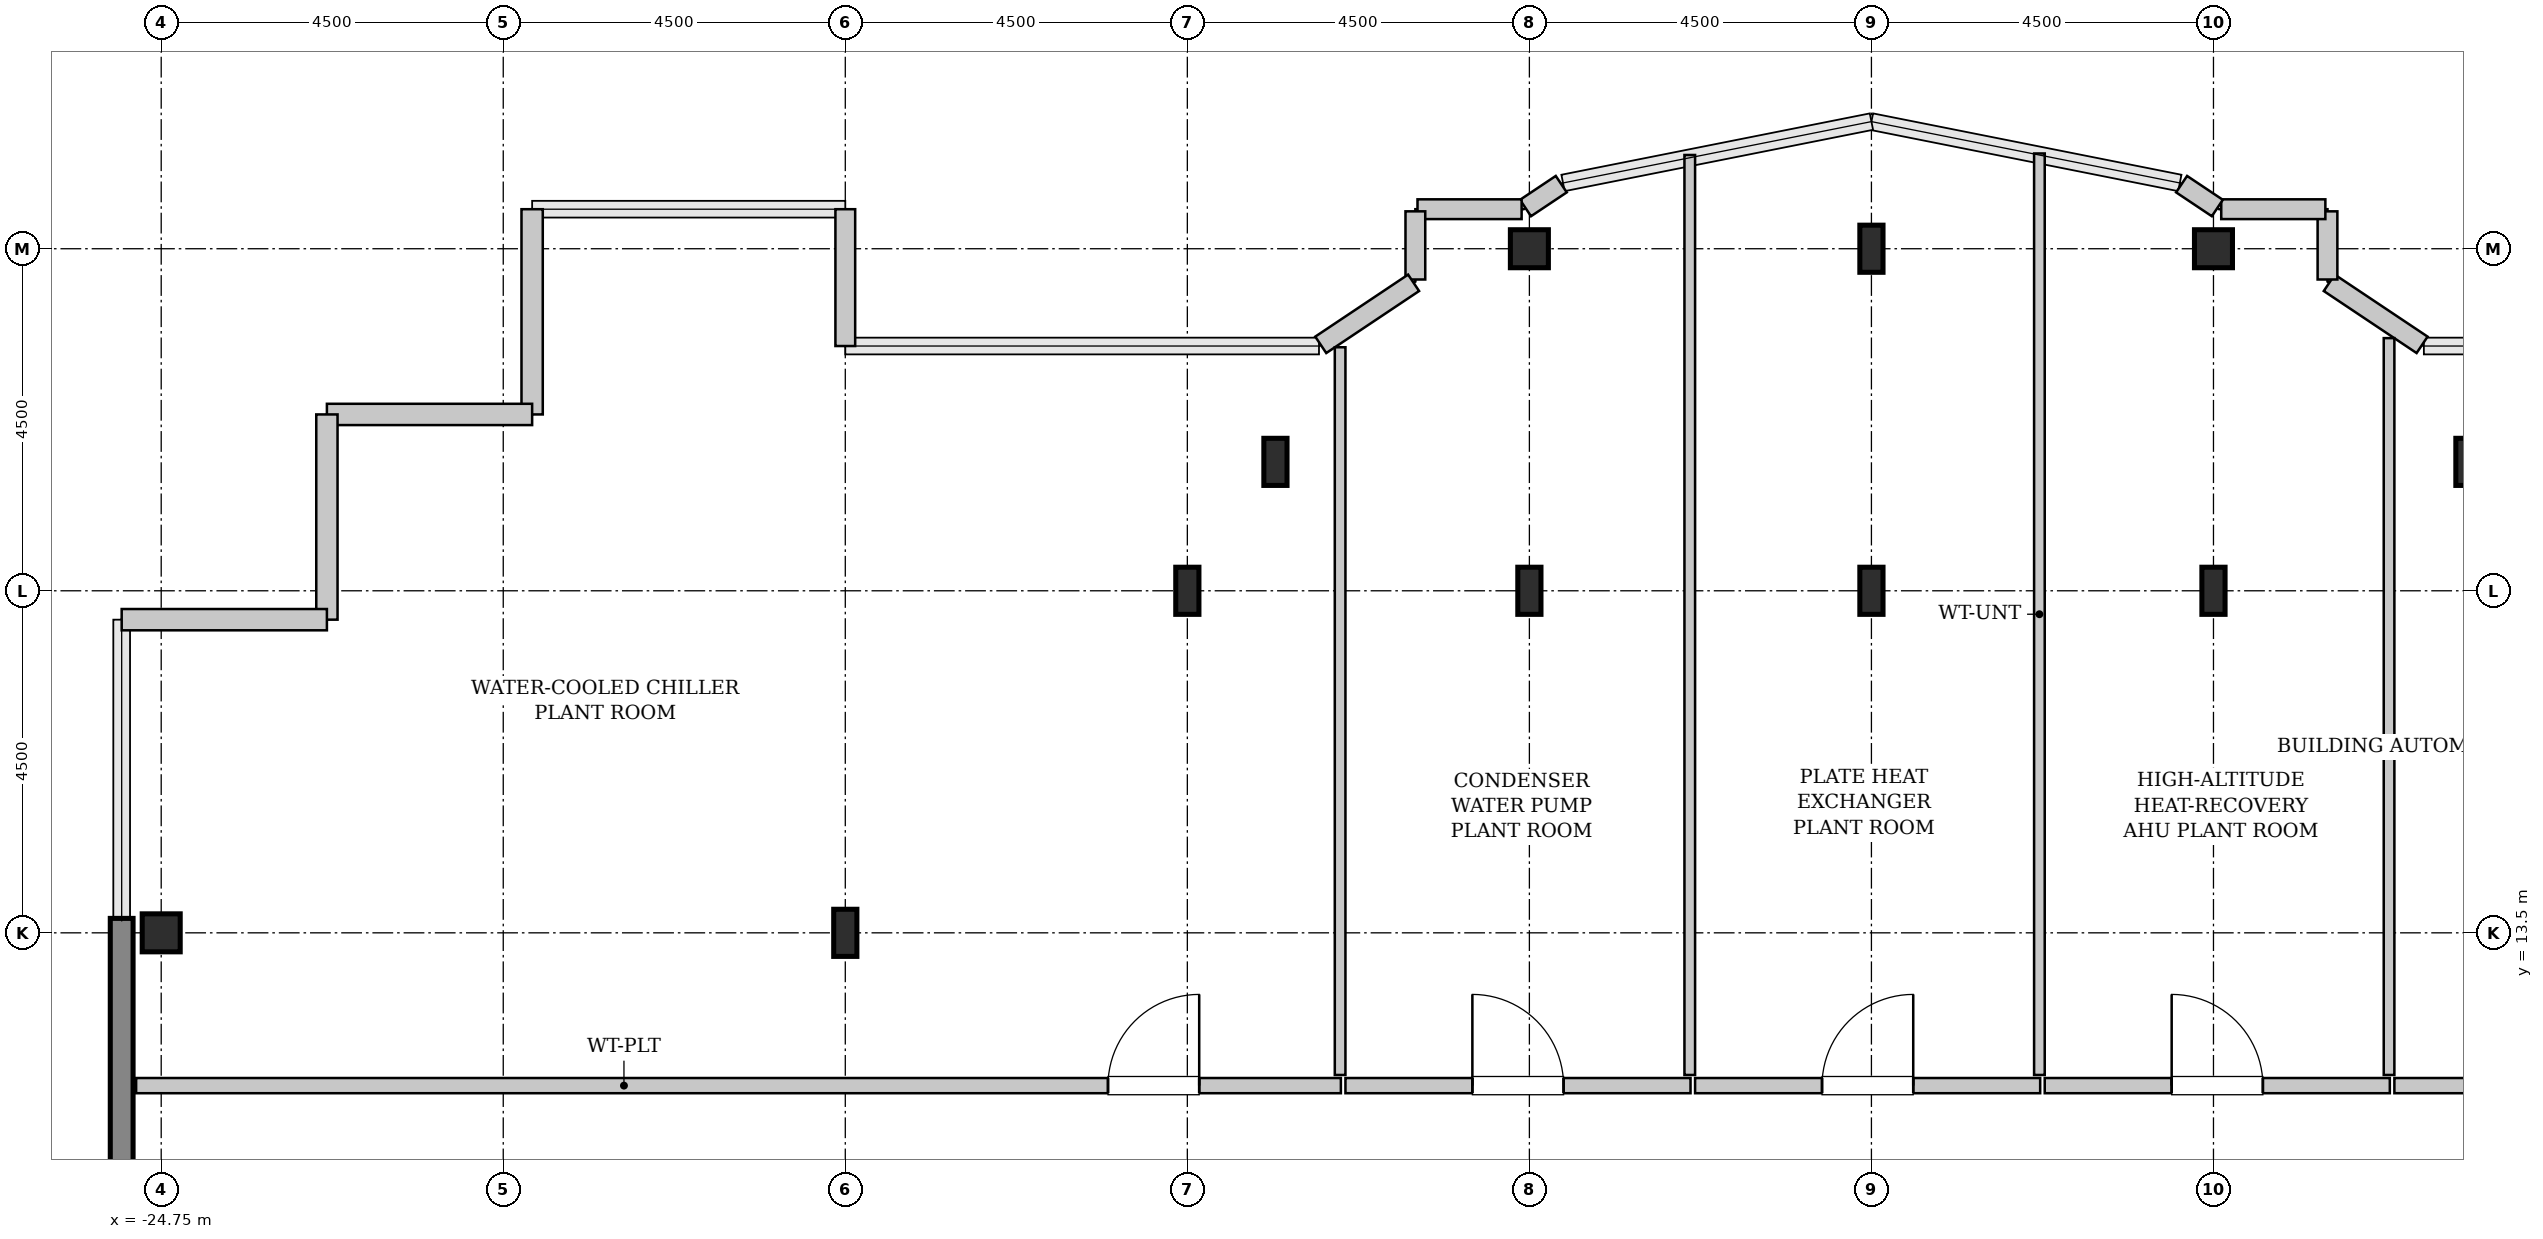
"""IFC4 building model, lengths in metres.
Left out: names, types, materials, properties, quantities, classifications, styles, units other than length and angle.
Written with IfcOpenShell. Run it as: python <this file> out.ifc"""

import sys

from ifc_helpers import new_model, si_unit, direction, frame, frame_2d, origin, origin_2d, place, context, subcontext, project, spatial, rectangle, hollow_rectangle, i_section, extrude, source, transform, mapped, element, fill, save


model = new_model("IFC4")
c1 = context("Model", 3, precision=1e-05, world=origin(), true_north=direction((0.0, 1.0)))
c2 = subcontext(c1, "Body", "Model", "MODEL_VIEW")
j1 = project(units=[si_unit("LENGTHUNIT", "METRE"), si_unit("PLANEANGLEUNIT", "RADIAN")], contexts=[c1])
p1 = place(None, origin())
s1 = spatial("IfcSite", under=j1, at=p1, CompositionType="ELEMENT")
p2 = place(p1, origin())
s2 = spatial("IfcBuilding", under=s1, at=p2, CompositionType="ELEMENT")
p3 = place(p2, frame((0.0, 0.0, 317.8)))
s3 = spatial("IfcBuildingStorey", under=s2, at=p3, CompositionType="ELEMENT", Elevation=317.8)
m1 = source(origin(), c2, "Body", "SweptSolid", [
    extrude(hollow_rectangle(XDim=0.5, YDim=0.5, WallThickness=0.025, InnerFilletRadius=0.025, OuterFilletRadius=0.05, at=origin_2d()), origin(), (0.0, 0.0, 1.0), 4.6),
])
p4 = place(p3, frame((-24.75, 13.5, 0.0), z_axis=(0.0, 0.0, 1.0), x_axis=(1.0, 0.0, 0.0)))
e1 = element("IfcColumn", 1, at=p4, inside=s3, PredefinedType="COLUMN", context=c2, shape_type="MappedRepresentation", body=[
    mapped(m1, transform((0.0, 0.0, 0.0), x_axis=(1.0, 0.0, 0.0), y_axis=(0.0, 1.0, 0.0), z_axis=(0.0, 0.0, 1.0), scale=1.0)),
])
m2 = source(origin(), c2, "Body", "SweptSolid", [
    extrude(i_section(OverallWidth=0.305, OverallDepth=0.62, WebThickness=0.021, FlangeThickness=0.04, FilletRadius=0.027, at=origin_2d()), origin(), (0.0, 0.0, 1.0), 4.6),
])
for number, where, z_axis, x_axis in (
    (2, (-15.75, 13.5, 0.0), (0.0, 0.0, 1.0), (1.0, 0.0, 0.0)),
    (3, (-11.25, 18.0, 0.0), (0.0, 0.0, 1.0), (1.0, 0.0, 0.0)),
    (4, (-10.091, 19.696, 0.0), (0.0, 0.0, 1.0), (1.0, 0.0, 0.0)),
    (5, (-6.75, 18.0, 0.0), (0.0, 0.0, 1.0), (1.0, 0.0, 0.0)),
):
    element("IfcColumn", number, at=place(p3, frame(where, z_axis=z_axis, x_axis=x_axis)), inside=s3, PredefinedType="COLUMN", context=c2, shape_type="MappedRepresentation", body=[
        mapped(m2, transform((0.0, 0.0, 0.0), x_axis=(1.0, 0.0, 0.0), y_axis=(0.0, 1.0, 0.0), z_axis=(0.0, 0.0, 1.0), scale=1.0)),
    ])
p5 = place(p3, frame((-6.75, 22.5, 0.0), z_axis=(0.0, 0.0, 1.0), x_axis=(1.0, 0.0, 0.0)))
e6 = element("IfcColumn", 6, at=p5, inside=s3, PredefinedType="COLUMN", context=c2, shape_type="MappedRepresentation", body=[
    mapped(m1, transform((0.0, 0.0, 0.0), x_axis=(1.0, 0.0, 0.0), y_axis=(0.0, 1.0, 0.0), z_axis=(0.0, 0.0, 1.0), scale=1.0)),
])
for number, where, z_axis, x_axis in (
    (7, (-2.25, 18.0, 0.0), (0.0, 0.0, 1.0), (1.0, 0.0, 0.0)),
    (8, (-2.25, 22.5, 0.0), (0.0, 0.0, 1.0), (1.0, 0.0, 0.0)),
    (9, (2.25, 18.0, 0.0), (0.0, 0.0, 1.0), (1.0, 0.0, 0.0)),
):
    element("IfcColumn", number, at=place(p3, frame(where, z_axis=z_axis, x_axis=x_axis)), inside=s3, PredefinedType="COLUMN", context=c2, shape_type="MappedRepresentation", body=[
        mapped(m2, transform((0.0, 0.0, 0.0), x_axis=(1.0, 0.0, 0.0), y_axis=(0.0, 1.0, 0.0), z_axis=(0.0, 0.0, 1.0), scale=1.0)),
    ])
p6 = place(p3, frame((2.25, 22.5, 0.0), z_axis=(0.0, 0.0, 1.0), x_axis=(1.0, 0.0, 0.0)))
e10 = element("IfcColumn", 10, at=p6, inside=s3, PredefinedType="COLUMN", context=c2, shape_type="MappedRepresentation", body=[
    mapped(m1, transform((0.0, 0.0, 0.0), x_axis=(1.0, 0.0, 0.0), y_axis=(0.0, 1.0, 0.0), z_axis=(0.0, 0.0, 1.0), scale=1.0)),
])
p7 = place(p3, frame((5.591, 19.696, 0.0), z_axis=(0.0, 0.0, 1.0), x_axis=(1.0, 0.0, 0.0)))
e11 = element("IfcColumn", 11, at=p7, inside=s3, PredefinedType="COLUMN", context=c2, shape_type="MappedRepresentation", body=[
    mapped(m2, transform((0.0, 0.0, 0.0), x_axis=(1.0, 0.0, 0.0), y_axis=(0.0, 1.0, 0.0), z_axis=(0.0, 0.0, 1.0), scale=1.0)),
])
m3 = source(origin(), c2, "Body", "SweptSolid", [
    extrude(rectangle(XDim=9.38, YDim=0.3, at=frame_2d((4.69, 0.0))), origin(), (0.0, 0.0, 1.0), 4.35),
])
p8 = place(p3, frame((-25.27, 4.31, 0.0), z_axis=(0.0, 0.0, 1.0), x_axis=(0.0, 1.0, 0.0)))
e12 = element("IfcWall", 12, at=p8, inside=s3, PredefinedType="SHEAR", context=c2, shape_type="MappedRepresentation", body=[
    mapped(m3, transform((0.0, 0.0, 0.0), x_axis=(1.0, 0.0, 0.0), y_axis=(0.0, 1.0, 0.0), z_axis=(0.0, 0.0, 1.0), scale=1.0)),
])
m4 = source(origin(), c2, "Body", "SweptSolid", [
    extrude(rectangle(XDim=1.469, YDim=0.26, at=frame_2d((0.734, 0.0))), origin(), (0.0, 0.0, 1.0), 4.35),
])
p9 = place(p3, frame((4.995, 21.236, 0.0), z_axis=(0.0, 0.0, 1.0), x_axis=(-0.831461760506, 0.555581983884, 0.0)))
e13 = element("IfcWall", 13, at=p9, inside=s3, PredefinedType="SOLIDWALL", context=c2, shape_type="MappedRepresentation", body=[
    mapped(m4, transform((0.0, 0.0, 0.0), x_axis=(1.0, 0.0, 0.0), y_axis=(0.0, 1.0, 0.0), z_axis=(0.0, 0.0, 1.0), scale=1.0)),
])
m5 = source(origin(), c2, "Body", "SweptSolid", [
    extrude(rectangle(XDim=0.897, YDim=0.26, at=frame_2d((0.448, 0.0))), origin(), (0.0, 0.0, 1.0), 4.35),
])
p10 = place(p3, frame((3.75, 22.095, 0.0), z_axis=(0.0, 0.0, 1.0), x_axis=(0.0, 1.0, 0.0)))
e14 = element("IfcWall", 14, at=p10, inside=s3, PredefinedType="SOLIDWALL", context=c2, shape_type="MappedRepresentation", body=[
    mapped(m5, transform((0.0, 0.0, 0.0), x_axis=(1.0, 0.0, 0.0), y_axis=(0.0, 1.0, 0.0), z_axis=(0.0, 0.0, 1.0), scale=1.0)),
])
m6 = source(origin(), c2, "Body", "SweptSolid", [
    extrude(rectangle(XDim=1.37, YDim=0.26, at=frame_2d((0.685, 0.0))), origin(), (0.0, 0.0, 1.0), 4.35),
])
p11 = place(p3, frame((3.722, 23.02, 0.0), z_axis=(0.0, 0.0, 1.0), x_axis=(-1.0, 0.0, 0.0)))
e15 = element("IfcWall", 15, at=p11, inside=s3, PredefinedType="SOLIDWALL", context=c2, shape_type="MappedRepresentation", body=[
    mapped(m6, transform((0.0, 0.0, 0.0), x_axis=(1.0, 0.0, 0.0), y_axis=(0.0, 1.0, 0.0), z_axis=(0.0, 0.0, 1.0), scale=1.0)),
])
m7 = source(origin(), c2, "Body", "SweptSolid", [
    extrude(rectangle(XDim=0.565, YDim=0.26, at=frame_2d((0.283, 0.0))), origin(), (0.0, 0.0, 1.0), 4.35),
])
for number, where, z_axis, x_axis in (
    (16, (2.301, 23.036, 0.0), (0.0, 0.0, 1.0), (-0.832, 0.555, 0.0)),
    (17, (-6.331, 23.35, 0.0), (0.0, 0.0, 1.0), (-0.832, -0.555, 0.0)),
):
    element("IfcWall", number, at=place(p3, frame(where, z_axis=z_axis, x_axis=x_axis)), inside=s3, PredefinedType="SOLIDWALL", context=c2, shape_type="MappedRepresentation", body=[
        mapped(m7, transform((0.0, 0.0, 0.0), x_axis=(1.0, 0.0, 0.0), y_axis=(0.0, 1.0, 0.0), z_axis=(0.0, 0.0, 1.0), scale=1.0)),
    ])
p12 = place(p3, frame((-6.852, 23.02, 0.0), z_axis=(0.0, 0.0, 1.0), x_axis=(-1.0, 0.0, 0.0)))
e18 = element("IfcWall", 18, at=p12, inside=s3, PredefinedType="SOLIDWALL", context=c2, shape_type="MappedRepresentation", body=[
    mapped(m6, transform((0.0, 0.0, 0.0), x_axis=(1.0, 0.0, 0.0), y_axis=(0.0, 1.0, 0.0), z_axis=(0.0, 0.0, 1.0), scale=1.0)),
])
p13 = place(p3, frame((-8.25, 22.992, 0.0), z_axis=(0.0, 0.0, 1.0), x_axis=(0.0, -1.0, 0.0)))
e19 = element("IfcWall", 19, at=p13, inside=s3, PredefinedType="SOLIDWALL", context=c2, shape_type="MappedRepresentation", body=[
    mapped(m5, transform((0.0, 0.0, 0.0), x_axis=(1.0, 0.0, 0.0), y_axis=(0.0, 1.0, 0.0), z_axis=(0.0, 0.0, 1.0), scale=1.0)),
])
p14 = place(p3, frame((-8.273, 22.052, 0.0), z_axis=(0.0, 0.0, 1.0), x_axis=(-0.831461760506, -0.555581983884, 0.0)))
e20 = element("IfcWall", 20, at=p14, inside=s3, PredefinedType="SOLIDWALL", context=c2, shape_type="MappedRepresentation", body=[
    mapped(m4, transform((0.0, 0.0, 0.0), x_axis=(1.0, 0.0, 0.0), y_axis=(0.0, 1.0, 0.0), z_axis=(0.0, 0.0, 1.0), scale=1.0)),
])
m8 = source(origin(), c2, "Body", "SweptSolid", [
    extrude(rectangle(XDim=1.8, YDim=0.26, at=frame_2d((0.9, 0.0))), origin(), (0.0, 0.0, 1.0), 4.35),
])
p15 = place(p3, frame((-15.75, 21.22, 0.0), z_axis=(0.0, 0.0, 1.0), x_axis=(0.0, 1.0, 0.0)))
e21 = element("IfcWall", 21, at=p15, inside=s3, PredefinedType="SOLIDWALL", context=c2, shape_type="MappedRepresentation", body=[
    mapped(m8, transform((0.0, 0.0, 0.0), x_axis=(1.0, 0.0, 0.0), y_axis=(0.0, 1.0, 0.0), z_axis=(0.0, 0.0, 1.0), scale=1.0)),
])
m9 = source(origin(), c2, "Body", "SweptSolid", [
    extrude(rectangle(XDim=2.7, YDim=0.28, at=frame_2d((1.35, 0.0))), origin(), (0.0, 0.0, 1.0), 4.35),
])
for number, where, z_axis, x_axis in (
    (22, (-19.87, 23.02, 0.0), (0.0, 0.0, 1.0), (0.0, -1.0, 0.0)),
    (23, (-19.87, 20.32, 0.0), (0.0, 0.0, 1.0), (-1.0, 0.0, 0.0)),
    (24, (-22.57, 20.32, 0.0), (0.0, 0.0, 1.0), (0.0, -1.0, 0.0)),
    (25, (-22.57, 17.62, 0.0), (0.0, 0.0, 1.0), (-1.0, 0.0, 0.0)),
):
    element("IfcWall", number, at=place(p3, frame(where, z_axis=z_axis, x_axis=x_axis)), inside=s3, PredefinedType="SOLIDWALL", context=c2, shape_type="MappedRepresentation", body=[
        mapped(m9, transform((0.0, 0.0, 0.0), x_axis=(1.0, 0.0, 0.0), y_axis=(0.0, 1.0, 0.0), z_axis=(0.0, 0.0, 1.0), scale=1.0)),
    ])
m10 = source(origin(), c2, "Body", "SweptSolid", [
    extrude(rectangle(XDim=15.85, YDim=0.2, at=frame_2d((7.925, 0.0))), origin(), (0.0, 0.0, 1.0), 4.335),
])
p16 = place(p3, frame((-25.08, 11.49, 0.0), z_axis=(0.0, 0.0, 1.0), x_axis=(1.0, 0.0, 0.0)))
e26 = element("IfcWall", 26, at=p16, inside=s3, PredefinedType="SOLIDWALL", context=c2, shape_type="MappedRepresentation", body=[
    mapped(m10, transform((0.0, 0.0, 0.0), x_axis=(1.0, 0.0, 0.0), y_axis=(0.0, 1.0, 0.0), z_axis=(0.0, 0.0, 1.0), scale=1.0)),
])
p17 = place(p16, frame((12.786, 0.0, 0.0)))
e27 = element("IfcOpeningElement", 27, at=p17, cuts=e26, PredefinedType="OPENING", context=c2, shape_type="SweptSolid", body=[
    extrude(rectangle(XDim=1.2, YDim=2.15, at=frame_2d((0.6, 1.075))), frame((0.0, 0.11, 0.0), z_axis=(0.0, -1.0, 0.0), x_axis=(1.0, 0.0, 0.0)), (0.0, 0.0, 1.0), 0.22),
])
m11 = source(origin(), c2, "Body", "SweptSolid", [
    extrude(rectangle(XDim=9.574, YDim=0.14, at=frame_2d((4.787, 0.0))), origin(), (0.0, 0.0, 1.0), 4.335),
])
p18 = place(p3, frame((-9.24, 11.63, 0.0), z_axis=(0.0, 0.0, 1.0), x_axis=(0.0, 1.0, 0.0)))
e28 = element("IfcWall", 28, at=p18, inside=s3, PredefinedType="PARTITIONING", context=c2, shape_type="MappedRepresentation", body=[
    mapped(m11, transform((0.0, 0.0, 0.0), x_axis=(1.0, 0.0, 0.0), y_axis=(0.0, 1.0, 0.0), z_axis=(0.0, 0.0, 1.0), scale=1.0)),
])
m12 = source(origin(), c2, "Body", "SweptSolid", [
    extrude(rectangle(XDim=4.54, YDim=0.2, at=frame_2d((2.27, 0.0))), origin(), (0.0, 0.0, 1.0), 4.335),
])
p19 = place(p3, frame((-9.17, 11.49, 0.0), z_axis=(0.0, 0.0, 1.0), x_axis=(1.0, 0.0, 0.0)))
e29 = element("IfcWall", 29, at=p19, inside=s3, PredefinedType="SOLIDWALL", context=c2, shape_type="MappedRepresentation", body=[
    mapped(m12, transform((0.0, 0.0, 0.0), x_axis=(1.0, 0.0, 0.0), y_axis=(0.0, 1.0, 0.0), z_axis=(0.0, 0.0, 1.0), scale=1.0)),
])
p20 = place(p19, frame((1.67, 0.0, 0.0)))
e30 = element("IfcOpeningElement", 30, at=p20, cuts=e29, PredefinedType="OPENING", context=c2, shape_type="SweptSolid", body=[
    extrude(rectangle(XDim=1.2, YDim=2.15, at=frame_2d((0.6, 1.075))), frame((0.0, 0.11, 0.0), z_axis=(0.0, -1.0, 0.0), x_axis=(1.0, 0.0, 0.0)), (0.0, 0.0, 1.0), 0.22),
])
m13 = source(origin(), c2, "Body", "SweptSolid", [
    extrude(rectangle(XDim=12.104, YDim=0.14, at=frame_2d((6.052, 0.0))), origin(), (0.0, 0.0, 1.0), 4.335),
])
p21 = place(p3, frame((-4.64, 11.63, 0.0), z_axis=(0.0, 0.0, 1.0), x_axis=(0.0, 1.0, 0.0)))
e31 = element("IfcWall", 31, at=p21, inside=s3, PredefinedType="PARTITIONING", context=c2, shape_type="MappedRepresentation", body=[
    mapped(m13, transform((0.0, 0.0, 0.0), x_axis=(1.0, 0.0, 0.0), y_axis=(0.0, 1.0, 0.0), z_axis=(0.0, 0.0, 1.0), scale=1.0)),
])
p22 = place(p3, frame((-4.57, 11.49, 0.0), z_axis=(0.0, 0.0, 1.0), x_axis=(1.0, 0.0, 0.0)))
e32 = element("IfcWall", 32, at=p22, inside=s3, PredefinedType="SOLIDWALL", context=c2, shape_type="MappedRepresentation", body=[
    mapped(m12, transform((0.0, 0.0, 0.0), x_axis=(1.0, 0.0, 0.0), y_axis=(0.0, 1.0, 0.0), z_axis=(0.0, 0.0, 1.0), scale=1.0)),
])
p23 = place(p22, frame((1.67, 0.0, 0.0)))
e33 = element("IfcOpeningElement", 33, at=p23, cuts=e32, PredefinedType="OPENING", context=c2, shape_type="SweptSolid", body=[
    extrude(rectangle(XDim=1.2, YDim=2.15, at=frame_2d((0.6, 1.075))), frame((0.0, 0.11, 0.0), z_axis=(0.0, -1.0, 0.0), x_axis=(1.0, 0.0, 0.0)), (0.0, 0.0, 1.0), 0.22),
])
m14 = source(origin(), c2, "Body", "SweptSolid", [
    extrude(rectangle(XDim=12.123, YDim=0.14, at=frame_2d((6.062, 0.0))), origin(), (0.0, 0.0, 1.0), 4.335),
])
p24 = place(p3, frame((-0.04, 11.63, 0.0), z_axis=(0.0, 0.0, 1.0), x_axis=(0.0, 1.0, 0.0)))
e34 = element("IfcWall", 34, at=p24, inside=s3, PredefinedType="PARTITIONING", context=c2, shape_type="MappedRepresentation", body=[
    mapped(m14, transform((0.0, 0.0, 0.0), x_axis=(1.0, 0.0, 0.0), y_axis=(0.0, 1.0, 0.0), z_axis=(0.0, 0.0, 1.0), scale=1.0)),
])
p25 = place(p3, frame((0.03, 11.49, 0.0), z_axis=(0.0, 0.0, 1.0), x_axis=(1.0, 0.0, 0.0)))
e35 = element("IfcWall", 35, at=p25, inside=s3, PredefinedType="SOLIDWALL", context=c2, shape_type="MappedRepresentation", body=[
    mapped(m12, transform((0.0, 0.0, 0.0), x_axis=(1.0, 0.0, 0.0), y_axis=(0.0, 1.0, 0.0), z_axis=(0.0, 0.0, 1.0), scale=1.0)),
])
p26 = place(p25, frame((1.67, 0.0, 0.0)))
e36 = element("IfcOpeningElement", 36, at=p26, cuts=e35, PredefinedType="OPENING", context=c2, shape_type="SweptSolid", body=[
    extrude(rectangle(XDim=1.2, YDim=2.15, at=frame_2d((0.6, 1.075))), frame((0.0, 0.11, 0.0), z_axis=(0.0, -1.0, 0.0), x_axis=(1.0, 0.0, 0.0)), (0.0, 0.0, 1.0), 0.22),
])
m15 = source(origin(), c2, "Body", "SweptSolid", [
    extrude(rectangle(XDim=9.694, YDim=0.14, at=frame_2d((4.847, 0.0))), origin(), (0.0, 0.0, 1.0), 4.335),
])
p27 = place(p3, frame((4.56, 11.63, 0.0), z_axis=(0.0, 0.0, 1.0), x_axis=(0.0, 1.0, 0.0)))
e37 = element("IfcWall", 37, at=p27, inside=s3, PredefinedType="PARTITIONING", context=c2, shape_type="MappedRepresentation", body=[
    mapped(m15, transform((0.0, 0.0, 0.0), x_axis=(1.0, 0.0, 0.0), y_axis=(0.0, 1.0, 0.0), z_axis=(0.0, 0.0, 1.0), scale=1.0)),
])
p28 = place(p3, frame((4.63, 11.49, 0.0), z_axis=(0.0, 0.0, 1.0), x_axis=(1.0, 0.0, 0.0)))
e38 = element("IfcWall", 38, at=p28, inside=s3, PredefinedType="SOLIDWALL", context=c2, shape_type="MappedRepresentation", body=[
    mapped(m12, transform((0.0, 0.0, 0.0), x_axis=(1.0, 0.0, 0.0), y_axis=(0.0, 1.0, 0.0), z_axis=(0.0, 0.0, 1.0), scale=1.0)),
])
p29 = place(p28, frame((1.67, 0.0, 0.0)))
e39 = element("IfcOpeningElement", 39, at=p29, cuts=e38, PredefinedType="OPENING", context=c2, shape_type="SweptSolid", body=[
    extrude(rectangle(XDim=1.2, YDim=2.15, at=frame_2d((0.6, 1.075))), frame((0.0, 0.11, 0.0), z_axis=(0.0, -1.0, 0.0), x_axis=(1.0, 0.0, 0.0)), (0.0, 0.0, 1.0), 0.22),
])
m16 = source(origin(), c2, "Body", "SweptSolid", [
    extrude(rectangle(XDim=1.2, YDim=2.15, at=frame_2d((0.6, 1.075))), frame((0.0, 0.025, 0.0), z_axis=(0.0, -1.0, 0.0), x_axis=(1.0, 0.0, 0.0)), (0.0, 0.0, 1.0), 0.05),
])
p30 = place(p17, origin())
e40 = element("IfcDoor", 40, at=p30, inside=s3, OperationType="SINGLE_SWING_RIGHT", PredefinedType="DOOR", context=c2, shape_type="MappedRepresentation", body=[
    mapped(m16, transform((0.0, 0.0, 0.0), x_axis=(1.0, 0.0, 0.0), y_axis=(0.0, 1.0, 0.0), z_axis=(0.0, 0.0, 1.0), scale=1.0)),
])
fill(e27, e40)
p31 = place(p20, origin())
e41 = element("IfcDoor", 41, at=p31, inside=s3, OperationType="SINGLE_SWING_LEFT", PredefinedType="DOOR", context=c2, shape_type="MappedRepresentation", body=[
    mapped(m16, transform((0.0, 0.0, 0.0), x_axis=(1.0, 0.0, 0.0), y_axis=(0.0, 1.0, 0.0), z_axis=(0.0, 0.0, 1.0), scale=1.0)),
])
fill(e30, e41)
p32 = place(p23, origin())
e42 = element("IfcDoor", 42, at=p32, inside=s3, OperationType="SINGLE_SWING_RIGHT", PredefinedType="DOOR", context=c2, shape_type="MappedRepresentation", body=[
    mapped(m16, transform((0.0, 0.0, 0.0), x_axis=(1.0, 0.0, 0.0), y_axis=(0.0, 1.0, 0.0), z_axis=(0.0, 0.0, 1.0), scale=1.0)),
])
fill(e33, e42)
p33 = place(p26, origin())
e43 = element("IfcDoor", 43, at=p33, inside=s3, OperationType="SINGLE_SWING_LEFT", PredefinedType="DOOR", context=c2, shape_type="MappedRepresentation", body=[
    mapped(m16, transform((0.0, 0.0, 0.0), x_axis=(1.0, 0.0, 0.0), y_axis=(0.0, 1.0, 0.0), z_axis=(0.0, 0.0, 1.0), scale=1.0)),
])
fill(e36, e43)
save(model, sys.argv[1])
